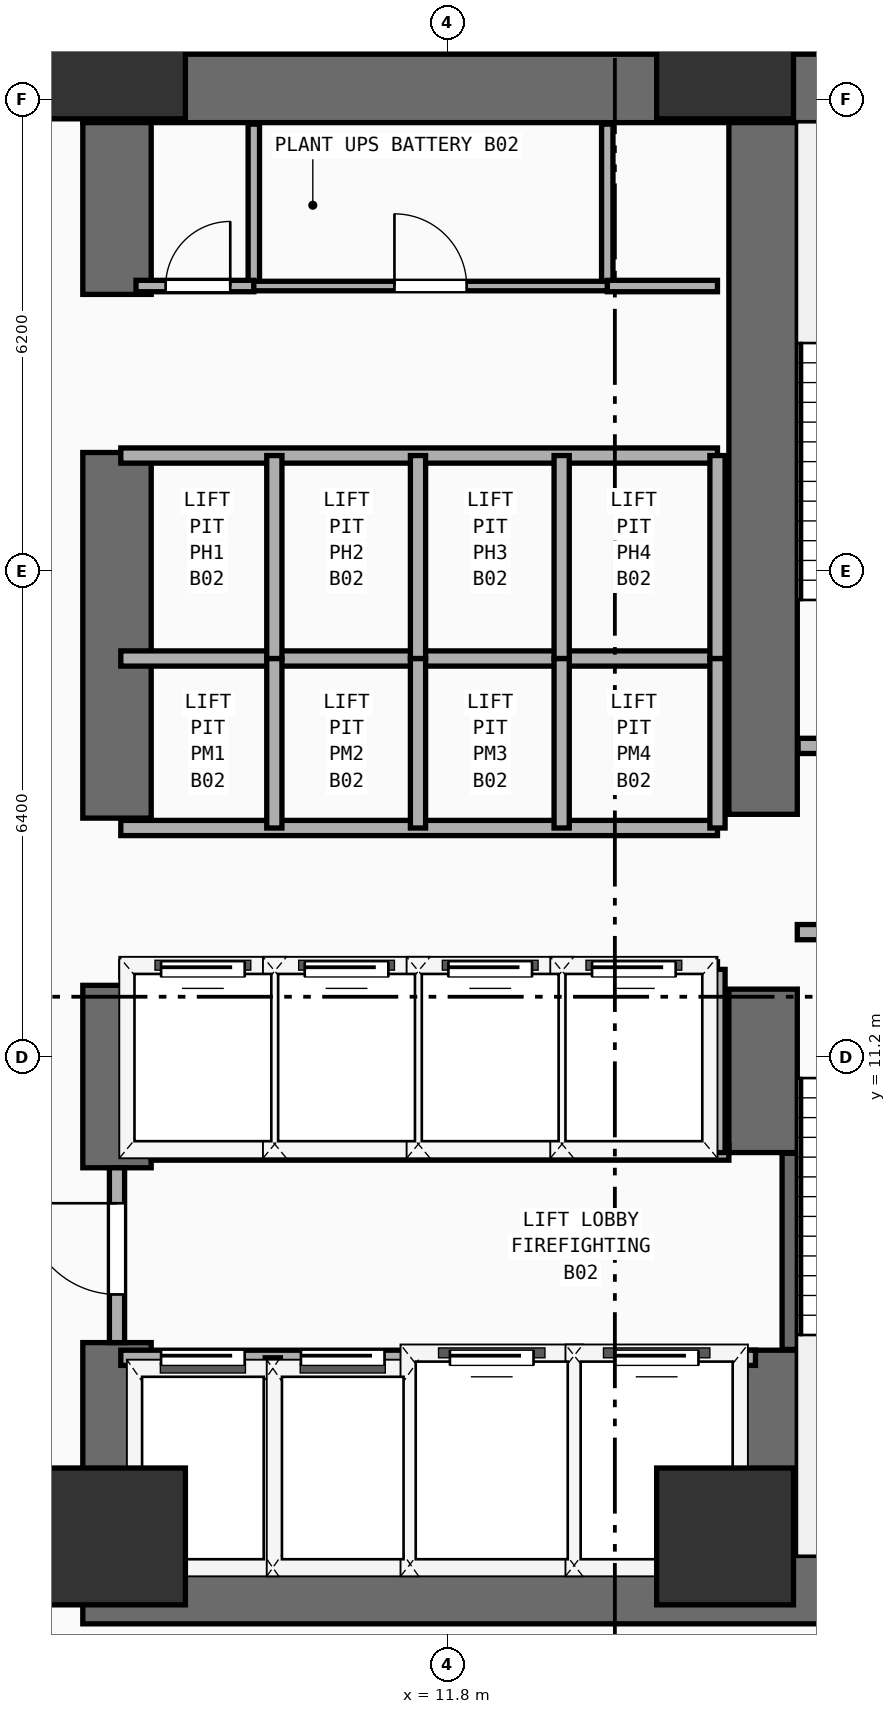
"""IFC4 building model, lengths in metres.
Left out: names, types, materials, properties, quantities, classifications, styles, units other than length and angle.
Written with IfcOpenShell. Run it as: python <this file> out.ifc"""

import sys

from ifc_helpers import new_model, si_unit, direction, frame, frame_2d, origin, origin_2d, place, context, subcontext, project, spatial, rectangle, extrude, element, fill, save


model = new_model("IFC4")
c1 = context("Model", 3, precision=1e-05, world=origin(), true_north=direction((0.0, 1.0)))
c2 = subcontext(c1, "Body", "Model", "MODEL_VIEW")
j1 = project(units=[si_unit("LENGTHUNIT", "METRE"), si_unit("PLANEANGLEUNIT", "RADIAN")], contexts=[c1])
p1 = place(None, origin())
s1 = spatial("IfcSite", under=j1, at=p1, CompositionType="ELEMENT")
p2 = place(p1, origin())
s2 = spatial("IfcBuilding", under=s1, at=p2, CompositionType="ELEMENT")
p3 = place(p2, frame((0.0, 0.0, -8.4)))
s3 = spatial("IfcBuildingStorey", under=s2, at=p3, CompositionType="ELEMENT", Elevation=-8.4)
for number, where, z_axis, x_axis in (
    (1, (7.0, 4.2, 0.0), (0.0, 0.0, 1.0), (1.0, 0.0, 0.0)),
    (2, (7.0, 23.95, 0.0), (0.0, 0.0, 1.0), (1.0, 0.0, 0.0)),
):
    element("IfcWall", number, at=place(p3, frame(where, z_axis=z_axis, x_axis=x_axis)), inside=s3, PredefinedType="SHEAR", context=c2, shape_type="SweptSolid", body=[
        extrude(rectangle(XDim=14.25, YDim=0.9, at=frame_2d((7.125, 0.0))), origin(), (0.0, 0.0, 1.0), 3.86),
    ])
p4 = place(p3, frame((7.45, 4.65, 0.0), z_axis=(0.0, 0.0, 1.0), x_axis=(0.0, 1.0, 0.0)))
e3 = element("IfcWall", 3, at=p4, inside=s3, PredefinedType="SHEAR", context=c2, shape_type="SweptSolid", body=[
    extrude(rectangle(XDim=2.8, YDim=0.9, at=frame_2d((1.4, 0.0))), origin(), (0.0, 0.0, 1.0), 3.86),
])
p5 = place(p3, frame((7.45, 9.75, 0.0), z_axis=(0.0, 0.0, 1.0), x_axis=(0.0, 1.0, 0.0)))
e4 = element("IfcWall", 4, at=p5, inside=s3, PredefinedType="SHEAR", context=c2, shape_type="SweptSolid", body=[
    extrude(rectangle(XDim=2.4, YDim=0.9, at=frame_2d((1.2, 0.0))), origin(), (0.0, 0.0, 1.0), 3.86),
])
p6 = place(p3, frame((7.45, 14.35, 0.0), z_axis=(0.0, 0.0, 1.0), x_axis=(0.0, 1.0, 0.0)))
e5 = element("IfcWall", 5, at=p6, inside=s3, PredefinedType="SHEAR", context=c2, shape_type="SweptSolid", body=[
    extrude(rectangle(XDim=4.81, YDim=0.9, at=frame_2d((2.405, 0.0))), origin(), (0.0, 0.0, 1.0), 3.86),
])
p7 = place(p3, frame((7.45, 21.24, 0.0), z_axis=(0.0, 0.0, 1.0), x_axis=(0.0, 1.0, 0.0)))
e6 = element("IfcWall", 6, at=p7, inside=s3, PredefinedType="SHEAR", context=c2, shape_type="SweptSolid", body=[
    extrude(rectangle(XDim=2.26, YDim=0.9, at=frame_2d((1.13, 0.0))), origin(), (0.0, 0.0, 1.0), 3.86),
])
p8 = place(p3, frame((15.95, 4.65, 0.0), z_axis=(0.0, 0.0, 1.0), x_axis=(0.0, 1.0, 0.0)))
e7 = element("IfcWall", 7, at=p8, inside=s3, PredefinedType="SHEAR", context=c2, shape_type="SweptSolid", body=[
    extrude(rectangle(XDim=2.7, YDim=0.9, at=frame_2d((1.35, 0.0))), origin(), (0.0, 0.0, 1.0), 3.86),
])
p9 = place(p3, frame((15.95, 9.95, 0.0), z_axis=(0.0, 0.0, 1.0), x_axis=(0.0, 1.0, 0.0)))
e8 = element("IfcWall", 8, at=p9, inside=s3, PredefinedType="SHEAR", context=c2, shape_type="SweptSolid", body=[
    extrude(rectangle(XDim=2.15, YDim=0.9, at=frame_2d((1.075, 0.0))), origin(), (0.0, 0.0, 1.0), 3.86),
])
p10 = place(p3, frame((15.95, 14.4, 0.0), z_axis=(0.0, 0.0, 1.0), x_axis=(0.0, 1.0, 0.0)))
e9 = element("IfcWall", 9, at=p10, inside=s3, PredefinedType="SHEAR", context=c2, shape_type="SweptSolid", body=[
    extrude(rectangle(XDim=9.1, YDim=0.9, at=frame_2d((4.55, 0.0))), origin(), (0.0, 0.0, 1.0), 3.86),
])
for number, where, z_axis, x_axis in (
    (10, (7.45, 4.9, 0.0), (0.0, 0.0, 1.0), (1.0, 0.0, 0.0)),
    (11, (15.45, 4.9, 0.0), (0.0, 0.0, 1.0), (1.0, 0.0, 0.0)),
    (12, (7.45, 24.45, 0.0), (0.0, 0.0, 1.0), (1.0, 0.0, 0.0)),
    (13, (15.45, 24.45, 0.0), (0.0, 0.0, 1.0), (1.0, 0.0, 0.0)),
):
    element("IfcColumn", number, at=place(p3, frame(where, z_axis=z_axis, x_axis=x_axis)), inside=s3, PredefinedType="COLUMN", context=c2, shape_type="SweptSolid", body=[
        extrude(rectangle(XDim=1.8, YDim=1.8, at=origin_2d()), origin(), (0.0, 0.0, 1.0), 3.86),
    ])
p11 = place(p3, frame((16.3, 7.36, 0.0), z_axis=(0.0, 0.0, 1.0), x_axis=(0.0, 1.0, 0.0)))
e14 = element("IfcWall", 14, at=p11, inside=s3, PredefinedType="SHEAR", context=c2, shape_type="SweptSolid", body=[
    extrude(rectangle(XDim=2.58, YDim=0.2, at=frame_2d((1.29, 0.0))), origin(), (0.0, 0.0, 1.0), 3.86),
])
p12 = place(p3, frame((16.4, 12.85, 0.0), z_axis=(0.0, 0.0, 1.0), x_axis=(1.0, 0.0, 0.0)))
e15 = element("IfcWall", 15, at=p12, inside=s3, PredefinedType="PARTITIONING", context=c2, shape_type="SweptSolid", body=[
    extrude(rectangle(XDim=3.96, YDim=0.2, at=frame_2d((1.98, 0.0))), origin(), (0.0, 0.0, 1.0), 3.86),
])
p13 = place(p12, frame((1.304, 0.0, 0.0)))
e16 = element("IfcOpeningElement", 16, at=p13, cuts=e15, PredefinedType="OPENING", context=c2, shape_type="SweptSolid", body=[
    extrude(rectangle(XDim=1.1, YDim=2.2, at=frame_2d((0.55, 1.1))), frame((0.0, 0.11, 0.0), z_axis=(0.0, -1.0, 0.0), x_axis=(1.0, 0.0, 0.0)), (0.0, 0.0, 1.0), 0.22),
])
p14 = place(p3, frame((16.41, 15.3, 0.0), z_axis=(0.0, 0.0, 1.0), x_axis=(1.0, 0.0, 0.0)))
e17 = element("IfcWall", 17, at=p14, inside=s3, PredefinedType="PARTITIONING", context=c2, shape_type="SweptSolid", body=[
    extrude(rectangle(XDim=3.95, YDim=0.2, at=frame_2d((1.975, 0.0))), origin(), (0.0, 0.0, 1.0), 3.86),
])
p15 = place(p14, frame((1.294, 0.0, 0.0)))
e18 = element("IfcOpeningElement", 18, at=p15, cuts=e17, PredefinedType="OPENING", context=c2, shape_type="SweptSolid", body=[
    extrude(rectangle(XDim=1.1, YDim=2.2, at=frame_2d((0.55, 1.1))), frame((0.0, 0.11, 0.0), z_axis=(0.0, -1.0, 0.0), x_axis=(1.0, 0.0, 0.0)), (0.0, 0.0, 1.0), 0.22),
])
p16 = place(p3, frame((7.5, 7.25, 0.0), z_axis=(0.0, 0.0, 1.0), x_axis=(1.0, 0.0, 0.0)))
e19 = element("IfcWall", 19, at=p16, inside=s3, PredefinedType="PARTITIONING", context=c2, shape_type="SweptSolid", body=[
    extrude(rectangle(XDim=8.35, YDim=0.2, at=frame_2d((4.175, 0.0))), origin(), (0.0, 0.0, 1.0), 3.86),
])
p17 = place(p16, frame((0.53, 0.0, 0.0)))
e20 = element("IfcOpeningElement", 20, at=p17, cuts=e19, PredefinedType="OPENING", context=c2, shape_type="SweptSolid", body=[
    extrude(rectangle(XDim=1.1, YDim=2.2, at=frame_2d((0.55, 1.1))), frame((0.0, 0.11, 0.0), z_axis=(0.0, -1.0, 0.0), x_axis=(1.0, 0.0, 0.0)), (0.0, 0.0, 1.0), 0.22),
])
p18 = place(p16, frame((2.37, 0.0, 0.0)))
e21 = element("IfcOpeningElement", 21, at=p18, cuts=e19, PredefinedType="OPENING", context=c2, shape_type="SweptSolid", body=[
    extrude(rectangle(XDim=1.1, YDim=2.2, at=frame_2d((0.55, 1.1))), frame((0.0, 0.11, 0.0), z_axis=(0.0, -1.0, 0.0), x_axis=(1.0, 0.0, 0.0)), (0.0, 0.0, 1.0), 0.22),
])
p19 = place(p16, frame((4.33, 0.0, 0.0)))
e22 = element("IfcOpeningElement", 22, at=p19, cuts=e19, PredefinedType="OPENING", context=c2, shape_type="SweptSolid", body=[
    extrude(rectangle(XDim=1.1, YDim=2.2, at=frame_2d((0.55, 1.1))), frame((0.0, 0.11, 0.0), z_axis=(0.0, -1.0, 0.0), x_axis=(1.0, 0.0, 0.0)), (0.0, 0.0, 1.0), 0.22),
])
p20 = place(p16, frame((6.5, 0.0, 0.0)))
e23 = element("IfcOpeningElement", 23, at=p20, cuts=e19, PredefinedType="OPENING", context=c2, shape_type="SweptSolid", body=[
    extrude(rectangle(XDim=1.1, YDim=2.2, at=frame_2d((0.55, 1.1))), frame((0.0, 0.11, 0.0), z_axis=(0.0, -1.0, 0.0), x_axis=(1.0, 0.0, 0.0)), (0.0, 0.0, 1.0), 0.22),
])
p21 = place(p3, frame((7.9, 9.95, 0.0), z_axis=(0.0, 0.0, 1.0), x_axis=(1.0, 0.0, 0.0)))
e24 = element("IfcWall", 24, at=p21, inside=s3, PredefinedType="PARTITIONING", context=c2, shape_type="SweptSolid", body=[
    extrude(rectangle(XDim=7.6, YDim=0.2, at=frame_2d((3.8, 0.0))), origin(), (0.0, 0.0, 1.0), 3.86),
])
for number, where, z_axis, x_axis in (
    (25, (9.5, 4.45, 0.0), (0.0, 0.0, 1.0), (0.0, 1.0, 0.0)),
    (26, (11.36, 4.45, 0.0), (0.0, 0.0, 1.0), (0.0, 1.0, 0.0)),
    (27, (13.46, 4.45, 0.0), (0.0, 0.0, 1.0), (0.0, 1.0, 0.0)),
):
    element("IfcWall", number, at=place(p3, frame(where, z_axis=z_axis, x_axis=x_axis)), inside=s3, PredefinedType="PARTITIONING", context=c2, shape_type="SweptSolid", body=[
        extrude(rectangle(XDim=2.8, YDim=0.2, at=frame_2d((1.4, 0.0))), origin(), (0.0, 0.0, 1.0), 3.86),
    ])
p22 = place(p3, frame((7.45, 7.45, 0.0), z_axis=(0.0, 0.0, 1.0), x_axis=(0.0, 1.0, 0.0)))
e28 = element("IfcWall", 28, at=p22, inside=s3, PredefinedType="PARTITIONING", context=c2, shape_type="SweptSolid", body=[
    extrude(rectangle(XDim=2.3, YDim=0.2, at=frame_2d((1.15, 0.0))), origin(), (0.0, 0.0, 1.0), 2.64),
])
p23 = place(p22, frame((0.633, 0.0, 0.0)))
e29 = element("IfcOpeningElement", 29, at=p23, cuts=e28, PredefinedType="OPENING", context=c2, shape_type="SweptSolid", body=[
    extrude(rectangle(XDim=1.2, YDim=2.25, at=frame_2d((0.6, 1.125))), frame((0.0, 0.11, 0.0), z_axis=(0.0, -1.0, 0.0), x_axis=(1.0, 0.0, 0.0)), (0.0, 0.0, 1.0), 0.22),
])
p24 = place(p3, frame((7.5, 12.36, 0.0), z_axis=(0.0, 0.0, 1.0), x_axis=(1.0, 0.0, 0.0)))
e30 = element("IfcWall", 30, at=p24, inside=s3, PredefinedType="PARTITIONING", context=c2, shape_type="SweptSolid", body=[
    extrude(rectangle(XDim=7.85, YDim=0.2, at=frame_2d((3.925, 0.0))), origin(), (0.0, 0.0, 1.0), 3.86),
])
p25 = place(p24, frame((0.53, 0.0, 0.0)))
e31 = element("IfcOpeningElement", 31, at=p25, cuts=e30, PredefinedType="OPENING", context=c2, shape_type="SweptSolid", body=[
    extrude(rectangle(XDim=1.1, YDim=2.2, at=frame_2d((0.55, 1.1))), frame((0.0, 0.11, 0.0), z_axis=(0.0, -1.0, 0.0), x_axis=(1.0, 0.0, 0.0)), (0.0, 0.0, 1.0), 0.22),
])
p26 = place(p24, frame((2.42, 0.0, 0.0)))
e32 = element("IfcOpeningElement", 32, at=p26, cuts=e30, PredefinedType="OPENING", context=c2, shape_type="SweptSolid", body=[
    extrude(rectangle(XDim=1.1, YDim=2.2, at=frame_2d((0.55, 1.1))), frame((0.0, 0.11, 0.0), z_axis=(0.0, -1.0, 0.0), x_axis=(1.0, 0.0, 0.0)), (0.0, 0.0, 1.0), 0.22),
])
p27 = place(p24, frame((4.31, 0.0, 0.0)))
e33 = element("IfcOpeningElement", 33, at=p27, cuts=e30, PredefinedType="OPENING", context=c2, shape_type="SweptSolid", body=[
    extrude(rectangle(XDim=1.1, YDim=2.2, at=frame_2d((0.55, 1.1))), frame((0.0, 0.11, 0.0), z_axis=(0.0, -1.0, 0.0), x_axis=(1.0, 0.0, 0.0)), (0.0, 0.0, 1.0), 0.22),
])
p28 = place(p24, frame((6.2, 0.0, 0.0)))
e34 = element("IfcOpeningElement", 34, at=p28, cuts=e30, PredefinedType="OPENING", context=c2, shape_type="SweptSolid", body=[
    extrude(rectangle(XDim=1.1, YDim=2.2, at=frame_2d((0.55, 1.1))), frame((0.0, 0.11, 0.0), z_axis=(0.0, -1.0, 0.0), x_axis=(1.0, 0.0, 0.0)), (0.0, 0.0, 1.0), 0.22),
])
for number, where, z_axis, x_axis in (
    (35, (15.35, 9.95, 0.0), (0.0, 0.0, 1.0), (0.0, 1.0, 0.0)),
    (36, (9.52, 9.95, 0.0), (0.0, 0.0, 1.0), (0.0, 1.0, 0.0)),
    (37, (11.41, 9.95, 0.0), (0.0, 0.0, 1.0), (0.0, 1.0, 0.0)),
    (38, (13.3, 9.95, 0.0), (0.0, 0.0, 1.0), (0.0, 1.0, 0.0)),
):
    element("IfcWall", number, at=place(p3, frame(where, z_axis=z_axis, x_axis=x_axis)), inside=s3, PredefinedType="PARTITIONING", context=c2, shape_type="SweptSolid", body=[
        extrude(rectangle(XDim=2.41, YDim=0.2, at=frame_2d((1.205, 0.0))), origin(), (0.0, 0.0, 1.0), 3.86),
    ])
for number, where, z_axis, x_axis in (
    (39, (7.5, 14.22, 0.0), (0.0, 0.0, 1.0), (1.0, 0.0, 0.0)),
    (40, (7.5, 16.45, 0.0), (0.0, 0.0, 1.0), (1.0, 0.0, 0.0)),
):
    element("IfcWall", number, at=place(p3, frame(where, z_axis=z_axis, x_axis=x_axis)), inside=s3, PredefinedType="PARTITIONING", context=c2, shape_type="SweptSolid", body=[
        extrude(rectangle(XDim=7.85, YDim=0.2, at=frame_2d((3.925, 0.0))), origin(), (0.0, 0.0, 1.0), 3.86),
    ])
for number, where, z_axis, x_axis in (
    (41, (15.35, 14.22, 0.0), (0.0, 0.0, 1.0), (0.0, 1.0, 0.0)),
    (42, (9.52, 14.22, 0.0), (0.0, 0.0, 1.0), (0.0, 1.0, 0.0)),
    (43, (11.41, 14.22, 0.0), (0.0, 0.0, 1.0), (0.0, 1.0, 0.0)),
    (44, (13.3, 14.22, 0.0), (0.0, 0.0, 1.0), (0.0, 1.0, 0.0)),
):
    element("IfcWall", number, at=place(p3, frame(where, z_axis=z_axis, x_axis=x_axis)), inside=s3, PredefinedType="PARTITIONING", context=c2, shape_type="SweptSolid", body=[
        extrude(rectangle(XDim=2.23, YDim=0.2, at=frame_2d((1.115, 0.0))), origin(), (0.0, 0.0, 1.0), 3.86),
    ])
p29 = place(p3, frame((7.5, 19.12, 0.0), z_axis=(0.0, 0.0, 1.0), x_axis=(1.0, 0.0, 0.0)))
e45 = element("IfcWall", 45, at=p29, inside=s3, PredefinedType="PARTITIONING", context=c2, shape_type="SweptSolid", body=[
    extrude(rectangle(XDim=7.85, YDim=0.2, at=frame_2d((3.925, 0.0))), origin(), (0.0, 0.0, 1.0), 3.86),
])
for number, where, z_axis, x_axis in (
    (46, (15.35, 16.45, 0.0), (0.0, 0.0, 1.0), (0.0, 1.0, 0.0)),
    (47, (9.52, 16.45, 0.0), (0.0, 0.0, 1.0), (0.0, 1.0, 0.0)),
    (48, (11.41, 16.45, 0.0), (0.0, 0.0, 1.0), (0.0, 1.0, 0.0)),
    (49, (13.3, 16.45, 0.0), (0.0, 0.0, 1.0), (0.0, 1.0, 0.0)),
):
    element("IfcWall", number, at=place(p3, frame(where, z_axis=z_axis, x_axis=x_axis)), inside=s3, PredefinedType="PARTITIONING", context=c2, shape_type="SweptSolid", body=[
        extrude(rectangle(XDim=2.67, YDim=0.2, at=frame_2d((1.335, 0.0))), origin(), (0.0, 0.0, 1.0), 3.86),
    ])
for number, where, z_axis, x_axis in (
    (50, (9.25, 21.35, 0.0), (0.0, 0.0, 1.0), (0.0, 1.0, 0.0)),
    (51, (13.9, 21.35, 0.0), (0.0, 0.0, 1.0), (0.0, 1.0, 0.0)),
):
    element("IfcWall", number, at=place(p3, frame(where, z_axis=z_axis, x_axis=x_axis)), inside=s3, PredefinedType="PARTITIONING", context=c2, shape_type="SweptSolid", body=[
        extrude(rectangle(XDim=2.13, YDim=0.15, at=frame_2d((1.065, 0.0))), origin(), (0.0, 0.0, 1.0), 3.86),
    ])
p30 = place(p3, frame((7.7, 21.35, 0.0), z_axis=(0.0, 0.0, 1.0), x_axis=(1.0, 0.0, 0.0)))
e52 = element("IfcWall", 52, at=p30, inside=s3, PredefinedType="PARTITIONING", context=c2, shape_type="SweptSolid", body=[
    extrude(rectangle(XDim=1.55, YDim=0.15, at=frame_2d((0.775, 0.0))), origin(), (0.0, 0.0, 1.0), 3.86),
])
p31 = place(p30, frame((0.39, 0.0, 0.0)))
e53 = element("IfcOpeningElement", 53, at=p31, cuts=e52, PredefinedType="OPENING", context=c2, shape_type="SweptSolid", body=[
    extrude(rectangle(XDim=0.85, YDim=2.15, at=frame_2d((0.425, 1.075))), frame((0.0, 0.085, 0.0), z_axis=(0.0, -1.0, 0.0), x_axis=(1.0, 0.0, 0.0)), (0.0, 0.0, 1.0), 0.17),
])
p32 = place(p3, frame((13.9, 21.35, 0.0), z_axis=(0.0, 0.0, 1.0), x_axis=(1.0, 0.0, 0.0)))
e54 = element("IfcWall", 54, at=p32, inside=s3, PredefinedType="PARTITIONING", context=c2, shape_type="SweptSolid", body=[
    extrude(rectangle(XDim=1.45, YDim=0.15, at=frame_2d((0.725, 0.0))), origin(), (0.0, 0.0, 1.0), 3.86),
])
p33 = place(p3, frame((9.25, 21.35, 0.0), z_axis=(0.0, 0.0, 1.0), x_axis=(1.0, 0.0, 0.0)))
e55 = element("IfcWall", 55, at=p33, inside=s3, PredefinedType="PARTITIONING", context=c2, shape_type="SweptSolid", body=[
    extrude(rectangle(XDim=4.65, YDim=0.125, at=frame_2d((2.325, 0.0))), origin(), (0.0, 0.0, 1.0), 3.86),
])
p34 = place(p33, frame((1.85, 0.0, 0.0)))
e56 = element("IfcOpeningElement", 56, at=p34, cuts=e55, PredefinedType="OPENING", context=c2, shape_type="SweptSolid", body=[
    extrude(rectangle(XDim=0.95, YDim=2.15, at=frame_2d((0.475, 1.075))), frame((0.0, 0.073, 0.0), z_axis=(0.0, -1.0, 0.0), x_axis=(1.0, 0.0, 0.0)), (0.0, 0.0, 1.0), 0.145),
])
p35 = place(p17, origin())
e57 = element("IfcDoor", 57, at=p35, inside=s3, OperationType="SLIDING_TO_LEFT", PredefinedType="DOOR", context=c2, shape_type="SweptSolid", body=[
    extrude(rectangle(XDim=1.1, YDim=2.2, at=frame_2d((0.55, 1.1))), frame((0.0, 0.025, 0.0), z_axis=(0.0, -1.0, 0.0), x_axis=(1.0, 0.0, 0.0)), (0.0, 0.0, 1.0), 0.05),
])
fill(e20, e57)
p36 = place(p18, origin())
e58 = element("IfcDoor", 58, at=p36, inside=s3, OperationType="SLIDING_TO_LEFT", PredefinedType="DOOR", context=c2, shape_type="SweptSolid", body=[
    extrude(rectangle(XDim=1.1, YDim=2.2, at=frame_2d((0.55, 1.1))), frame((0.0, 0.025, 0.0), z_axis=(0.0, -1.0, 0.0), x_axis=(1.0, 0.0, 0.0)), (0.0, 0.0, 1.0), 0.05),
])
fill(e21, e58)
p37 = place(p19, origin())
e59 = element("IfcDoor", 59, at=p37, inside=s3, OperationType="SLIDING_TO_LEFT", PredefinedType="DOOR", context=c2, shape_type="SweptSolid", body=[
    extrude(rectangle(XDim=1.1, YDim=2.2, at=frame_2d((0.55, 1.1))), frame((0.0, 0.025, 0.0), z_axis=(0.0, -1.0, 0.0), x_axis=(1.0, 0.0, 0.0)), (0.0, 0.0, 1.0), 0.05),
])
fill(e22, e59)
p38 = place(p20, origin())
e60 = element("IfcDoor", 60, at=p38, inside=s3, OperationType="SLIDING_TO_LEFT", PredefinedType="DOOR", context=c2, shape_type="SweptSolid", body=[
    extrude(rectangle(XDim=1.1, YDim=2.2, at=frame_2d((0.55, 1.1))), frame((0.0, 0.025, 0.0), z_axis=(0.0, -1.0, 0.0), x_axis=(1.0, 0.0, 0.0)), (0.0, 0.0, 1.0), 0.05),
])
fill(e23, e60)
p39 = place(p23, frame((1.2, 0.0, 0.0), z_axis=(0.0, 0.0, 1.0), x_axis=(-1.0, 0.0, 0.0)))
e61 = element("IfcDoor", 61, at=p39, inside=s3, OperationType="SINGLE_SWING_LEFT", PredefinedType="DOOR", context=c2, shape_type="SweptSolid", body=[
    extrude(rectangle(XDim=1.2, YDim=2.25, at=frame_2d((0.6, 1.125))), frame((0.0, 0.025, 0.0), z_axis=(0.0, -1.0, 0.0), x_axis=(1.0, 0.0, 0.0)), (0.0, 0.0, 1.0), 0.05),
])
fill(e29, e61)
p40 = place(p25, origin())
e62 = element("IfcDoor", 62, at=p40, inside=s3, OperationType="SLIDING_TO_LEFT", PredefinedType="DOOR", context=c2, shape_type="SweptSolid", body=[
    extrude(rectangle(XDim=1.1, YDim=2.2, at=frame_2d((0.55, 1.1))), frame((0.0, 0.025, 0.0), z_axis=(0.0, -1.0, 0.0), x_axis=(1.0, 0.0, 0.0)), (0.0, 0.0, 1.0), 0.05),
])
fill(e31, e62)
p41 = place(p26, origin())
e63 = element("IfcDoor", 63, at=p41, inside=s3, OperationType="SLIDING_TO_LEFT", PredefinedType="DOOR", context=c2, shape_type="SweptSolid", body=[
    extrude(rectangle(XDim=1.1, YDim=2.2, at=frame_2d((0.55, 1.1))), frame((0.0, 0.025, 0.0), z_axis=(0.0, -1.0, 0.0), x_axis=(1.0, 0.0, 0.0)), (0.0, 0.0, 1.0), 0.05),
])
fill(e32, e63)
p42 = place(p27, origin())
e64 = element("IfcDoor", 64, at=p42, inside=s3, OperationType="SLIDING_TO_LEFT", PredefinedType="DOOR", context=c2, shape_type="SweptSolid", body=[
    extrude(rectangle(XDim=1.1, YDim=2.2, at=frame_2d((0.55, 1.1))), frame((0.0, 0.025, 0.0), z_axis=(0.0, -1.0, 0.0), x_axis=(1.0, 0.0, 0.0)), (0.0, 0.0, 1.0), 0.05),
])
fill(e33, e64)
p43 = place(p28, origin())
e65 = element("IfcDoor", 65, at=p43, inside=s3, OperationType="SLIDING_TO_LEFT", PredefinedType="DOOR", context=c2, shape_type="SweptSolid", body=[
    extrude(rectangle(XDim=1.1, YDim=2.2, at=frame_2d((0.55, 1.1))), frame((0.0, 0.025, 0.0), z_axis=(0.0, -1.0, 0.0), x_axis=(1.0, 0.0, 0.0)), (0.0, 0.0, 1.0), 0.05),
])
fill(e34, e65)
p44 = place(p31, origin())
e66 = element("IfcDoor", 66, at=p44, inside=s3, OperationType="SINGLE_SWING_RIGHT", PredefinedType="DOOR", context=c2, shape_type="SweptSolid", body=[
    extrude(rectangle(XDim=0.85, YDim=2.15, at=frame_2d((0.425, 1.075))), frame((0.0, 0.025, 0.0), z_axis=(0.0, -1.0, 0.0), x_axis=(1.0, 0.0, 0.0)), (0.0, 0.0, 1.0), 0.05),
])
fill(e53, e66)
p45 = place(p34, origin())
e67 = element("IfcDoor", 67, at=p45, inside=s3, OperationType="SINGLE_SWING_LEFT", PredefinedType="DOOR", context=c2, shape_type="SweptSolid", body=[
    extrude(rectangle(XDim=0.95, YDim=2.15, at=frame_2d((0.475, 1.075))), frame((0.0, 0.025, 0.0), z_axis=(0.0, -1.0, 0.0), x_axis=(1.0, 0.0, 0.0)), (0.0, 0.0, 1.0), 0.05),
])
fill(e56, e67)
save(model, sys.argv[1])
